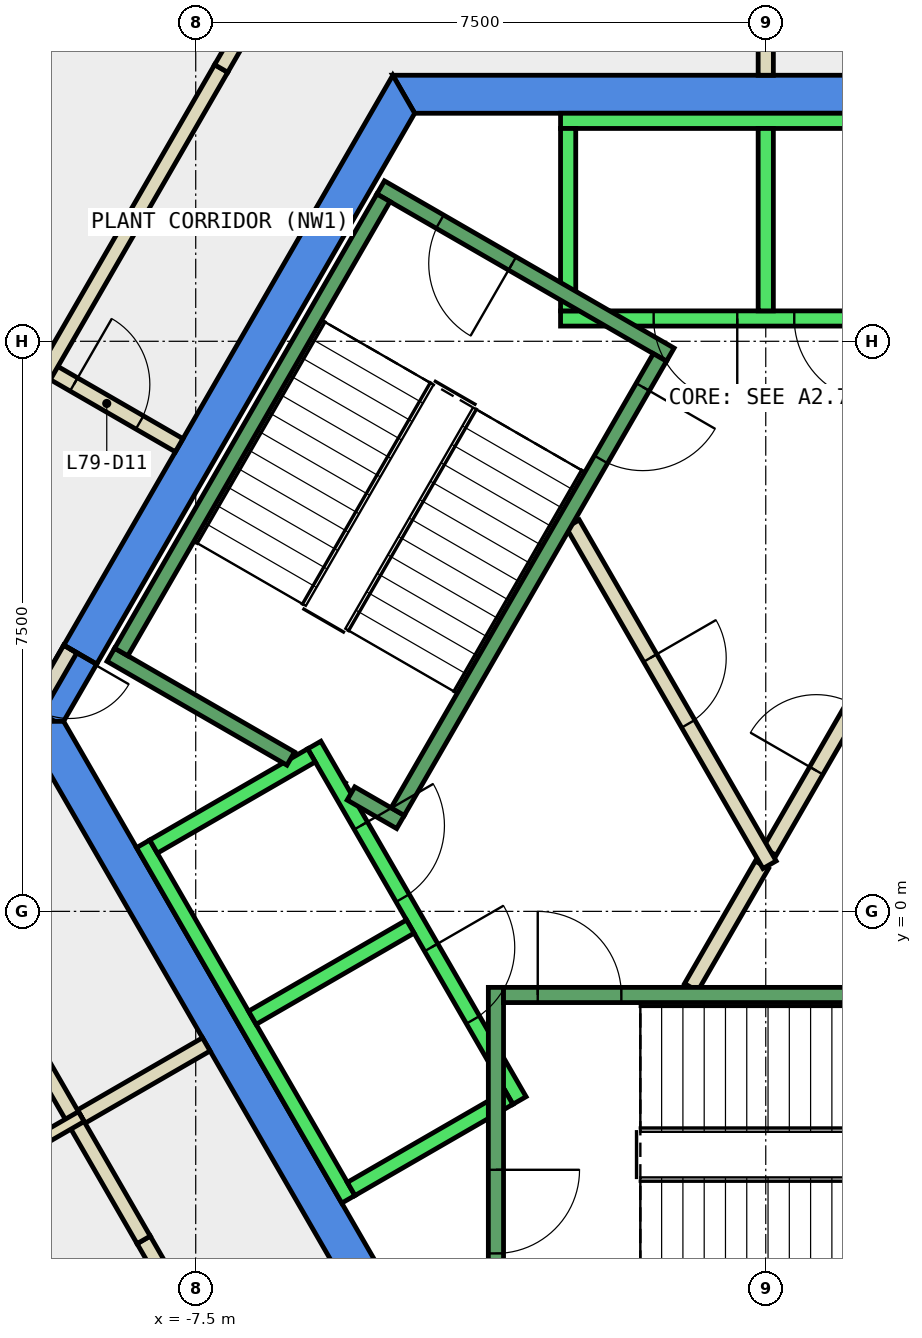
"""IFC4 building model, lengths in metres.
Left out: names, types, materials, properties, quantities, classifications, styles, units other than length and angle.
Written with IfcOpenShell. Run it as: python <this file> out.ifc"""

import sys

from ifc_helpers import new_model, si_unit, direction, frame, frame_2d, origin, place, context, subcontext, project, spatial, polyline, rectangle, outline, extrude, element, fill, save


model = new_model("IFC4")
c1 = context("Model", 3, precision=1e-05, world=origin(), true_north=direction((0.0, 1.0)))
c2 = subcontext(c1, "Body", "Model", "MODEL_VIEW")
j1 = project(units=[si_unit("LENGTHUNIT", "METRE"), si_unit("PLANEANGLEUNIT", "RADIAN")], contexts=[c1])
p1 = place(None, origin())
s1 = spatial("IfcSite", under=j1, at=p1, CompositionType="ELEMENT")
p2 = place(p1, origin())
s2 = spatial("IfcBuilding", under=s1, at=p2, CompositionType="ELEMENT")
p3 = place(p2, frame((0.0, 0.0, 335.9)))
s3 = spatial("IfcBuildingStorey", under=s2, at=p3, CompositionType="ELEMENT", Elevation=335.9)
p4 = place(p3, frame((0.0, 0.0, -0.35)))
e1 = element("IfcWall", 1, at=p4, inside=s3, PredefinedType="SHEAR", context=c2, shape_type="SweptSolid", body=[
    extrude(outline(polyline([(4.907, 11.0), (-4.907, 11.0), (-4.619, 10.5), (4.619, 10.5), (4.907, 11.0)])), origin(), (0.0, 0.0, 1.0), 4.4),
])
p5 = place(p3, frame((0.0, 0.0, -0.35)))
e2 = element("IfcWall", 2, at=p5, inside=s3, PredefinedType="SHEAR", context=c2, shape_type="SweptSolid", body=[
    extrude(outline(polyline([(-9.236, 3.502), (-8.803, 3.253), (-4.619, 10.5), (-4.907, 11.0), (-9.236, 3.502)])), origin(), (0.0, 0.0, 1.0), 4.4),
])
p6 = place(p3, frame((0.0, 0.0, 3.6)))
e3 = element("IfcWall", 3, at=p6, inside=s3, PredefinedType="SHEAR", context=c2, shape_type="SweptSolid", body=[
    extrude(outline(polyline([(-9.7, 2.7), (-9.354, 2.5), (-9.238, 2.5), (-8.803, 3.253), (-9.236, 3.502), (-9.7, 2.7)])), origin(), (0.0, 0.0, 1.0), 0.45),
])
p7 = place(p3, frame((0.0, 0.0, -0.35)))
e4 = element("IfcWall", 4, at=p7, inside=s3, PredefinedType="SHEAR", context=c2, shape_type="SweptSolid", body=[
    extrude(outline(polyline([(-9.815, 2.5), (-4.907, -6.0), (-4.619, -5.5), (-9.238, 2.5), (-9.815, 2.5)])), origin(), (0.0, 0.0, 1.0), 4.4),
])
p8 = place(p3, frame((-0.982, -1.0, 0.0), z_axis=(0.0, 0.0, 1.0), x_axis=(0.50024047865, 0.865886518847, 0.0)))
e5 = element("IfcWall", 5, at=p8, inside=s3, PredefinedType="PARTITIONING", context=c2, shape_type="SweptSolid", body=[
    extrude(rectangle(XDim=1.863, YDim=0.2, at=frame_2d((0.931, 0.0))), origin(), (0.0, 0.0, 1.0), 4.05),
])
p9 = place(p3, frame((0.05, 0.787, 0.0), z_axis=(0.0, 0.0, 1.0), x_axis=(0.499954076797, 0.866051915934, 0.0)))
e6 = element("IfcWall", 6, at=p9, inside=s3, PredefinedType="PARTITIONING", context=c2, shape_type="SweptSolid", body=[
    extrude(rectangle(XDim=3.558, YDim=0.2, at=frame_2d((1.779, 0.0))), origin(), (0.0, 0.0, 1.0), 4.05),
])
p10 = place(p9, frame((1.229, 0.0, 0.0)))
e7 = element("IfcOpeningElement", 7, at=p10, cuts=e6, PredefinedType="OPENING", context=c2, shape_type="SweptSolid", body=[
    extrude(rectangle(XDim=1.0, YDim=2.1, at=frame_2d((0.5, 1.05))), frame((0.0, 0.11, 0.0), z_axis=(0.0, -1.0, 0.0), x_axis=(1.0, 0.0, 0.0)), (0.0, 0.0, 1.0), 0.22),
])
p11 = place(p3, frame((-2.54, 5.1, 0.0), z_axis=(0.0, 0.0, 1.0), x_axis=(0.499925051871, -0.866068670783, 0.0)))
e8 = element("IfcWall", 8, at=p11, inside=s3, PredefinedType="PARTITIONING", context=c2, shape_type="SweptSolid", body=[
    extrude(rectangle(XDim=5.181, YDim=0.2, at=frame_2d((2.59, 0.0))), origin(), (0.0, 0.0, 1.0), 4.05),
])
p12 = place(p11, frame((2.04, 0.0, 0.0)))
e9 = element("IfcOpeningElement", 9, at=p12, cuts=e8, PredefinedType="OPENING", context=c2, shape_type="SweptSolid", body=[
    extrude(rectangle(XDim=1.0, YDim=2.1, at=frame_2d((0.5, 1.05))), frame((0.0, 0.11, 0.0), z_axis=(0.0, -1.0, 0.0), x_axis=(1.0, 0.0, 0.0)), (0.0, 0.0, 1.0), 0.22),
])
p13 = place(p3, frame((-9.006, -2.7, 0.0), z_axis=(0.0, 0.0, 1.0), x_axis=(0.865980106173, 0.500078449558, 0.0)))
e10 = element("IfcWall", 10, at=p13, inside=s3, PredefinedType="PARTITIONING", context=c2, shape_type="SweptSolid", body=[
    extrude(rectangle(XDim=1.9, YDim=0.2, at=frame_2d((0.95, 0.0))), origin(), (0.0, 0.0, 1.0), 4.05),
])
p14 = place(p3, frame((0.0, 11.0, 0.0), z_axis=(0.0, 0.0, 1.0), x_axis=(0.0, 1.0, 0.0)))
e11 = element("IfcWall", 11, at=p14, inside=s3, PredefinedType="PARTITIONING", context=c2, shape_type="SweptSolid", body=[
    extrude(rectangle(XDim=1.9, YDim=0.2, at=frame_2d((0.95, 0.0))), origin(), (0.0, 0.0, 1.0), 1.95),
])
p15 = place(p3, frame((-9.45, 7.132, 0.0), z_axis=(0.0, 0.0, 1.0), x_axis=(0.866010750942, -0.50002537861, 0.0)))
e12 = element("IfcWall", 12, at=p15, inside=s3, PredefinedType="PARTITIONING", context=c2, shape_type="SweptSolid", body=[
    extrude(rectangle(XDim=2.0, YDim=0.2, at=frame_2d((1.0, 0.0))), origin(), (0.0, 0.0, 1.0), 4.05),
])
p16 = place(p15, frame((0.4, 0.0, 0.0)))
e13 = element("IfcOpeningElement", 13, at=p16, cuts=e12, PredefinedType="OPENING", context=c2, shape_type="SweptSolid", body=[
    extrude(rectangle(XDim=1.0, YDim=2.1, at=frame_2d((0.5, 1.05))), frame((0.0, 0.11, 0.0), z_axis=(0.0, -1.0, 0.0), x_axis=(1.0, 0.0, 0.0)), (0.0, 0.0, 1.0), 0.22),
])
p17 = place(p3, frame((-9.105, -2.728, 0.0), z_axis=(0.0, 0.0, 1.0), x_axis=(-0.499849883363, 0.866112056319, 0.0)))
e14 = element("IfcWall", 14, at=p17, inside=s3, PredefinedType="PARTITIONING", context=c2, shape_type="SweptSolid", body=[
    extrude(rectangle(XDim=0.885, YDim=0.2, at=frame_2d((0.442, 0.0))), origin(), (0.0, 0.0, 1.0), 4.05),
])
p18 = place(p3, frame((-9.5, 7.045, 0.0), z_axis=(0.0, 0.0, 1.0), x_axis=(0.500007559336, 0.866021039356, 0.0)))
e15 = element("IfcWall", 15, at=p18, inside=s3, PredefinedType="PARTITIONING", context=c2, shape_type="SweptSolid", body=[
    extrude(rectangle(XDim=4.67, YDim=0.2, at=frame_2d((2.335, 0.0))), origin(), (0.0, 0.0, 1.0), 4.05),
])
p19 = place(p3, frame((-9.15, 3.452, 0.0), z_axis=(0.0, 0.0, 1.0), x_axis=(-0.500079945886, -0.865979242085, 0.0)))
e16 = element("IfcWall", 16, at=p19, inside=s3, PredefinedType="PARTITIONING", context=c2, shape_type="SweptSolid", body=[
    extrude(rectangle(XDim=0.926, YDim=0.2, at=frame_2d((0.463, 0.0))), origin(), (0.0, 0.0, 1.0), 2.4),
])
p20 = place(p19, frame((0.017, 0.0, 0.0)))
e17 = element("IfcOpeningElement", 17, at=p20, cuts=e16, PredefinedType="OPENING", context=c2, shape_type="SweptSolid", body=[
    extrude(rectangle(XDim=0.9, YDim=2.1, at=frame_2d((0.45, 1.05))), frame((0.0, 0.11, 0.0), z_axis=(0.0, -1.0, 0.0), x_axis=(1.0, 0.0, 0.0)), (0.0, 0.0, 1.0), 0.22),
])
p21 = place(p3, frame((-7.835, -4.928, 0.0), z_axis=(0.0, 0.0, 1.0), x_axis=(-0.500265973451, 0.865871789474, 0.0)))
e18 = element("IfcWall", 18, at=p21, inside=s3, PredefinedType="PARTITIONING", context=c2, shape_type="SweptSolid", body=[
    extrude(rectangle(XDim=0.7, YDim=0.2, at=frame_2d((0.35, 0.0))), origin(), (0.0, 0.0, 1.0), 1.95),
])
p22 = place(p3, frame((-8.185, -4.322, 0.0), z_axis=(0.0, 0.0, 1.0), x_axis=(-0.499848773445, 0.866112696874, 0.0)))
e19 = element("IfcWall", 19, at=p22, inside=s3, PredefinedType="PARTITIONING", context=c2, shape_type="SweptSolid", body=[
    extrude(rectangle(XDim=1.84, YDim=0.2, at=frame_2d((0.92, 0.0))), origin(), (0.0, 0.0, 1.0), 4.05),
])
p23 = place(p3, frame((-20.401, -9.28, 0.0), z_axis=(0.0, 0.0, 1.0), x_axis=(0.865982571061, 0.500074181116, 0.0)))
e20 = element("IfcWall", 20, at=p23, inside=s3, PredefinedType="PARTITIONING", context=c2, shape_type="SweptSolid", body=[
    extrude(rectangle(XDim=13.158, YDim=0.15, at=frame_2d((6.579, 0.0))), origin(), (0.0, 0.0, 1.0), 4.05),
])
p24 = place(p3, frame((-7.165, 11.089, 0.0), z_axis=(0.0, 0.0, 1.0), x_axis=(0.499024148071, 0.866588079564, 0.0)))
e21 = element("IfcWall", 21, at=p24, inside=s3, PredefinedType="PARTITIONING", context=c2, shape_type="SweptSolid", body=[
    extrude(rectangle(XDim=0.838, YDim=0.2, at=frame_2d((0.419, 0.0))), origin(), (0.0, 0.0, 1.0), 1.95),
])
p25 = place(p3, frame((2.7, 7.8, 0.0), z_axis=(0.0, 0.0, 1.0), x_axis=(-1.0, 0.0, 0.0)))
e22 = element("IfcWall", 22, at=p25, inside=s3, PredefinedType="STANDARD", context=c2, shape_type="SweptSolid", body=[
    extrude(rectangle(XDim=5.4, YDim=0.2, at=frame_2d((2.7, 0.0))), origin(), (0.0, 0.0, 1.0), 4.05),
])
p26 = place(p25, frame((1.225, 0.0, 0.0)))
e23 = element("IfcOpeningElement", 23, at=p26, cuts=e22, PredefinedType="OPENING", context=c2, shape_type="SweptSolid", body=[
    extrude(rectangle(XDim=1.1, YDim=2.1, at=frame_2d((0.55, 1.05))), frame((0.0, 0.11, 0.0), z_axis=(0.0, -1.0, 0.0), x_axis=(1.0, 0.0, 0.0)), (0.0, 0.0, 1.0), 0.22),
])
p27 = place(p25, frame((3.075, 0.0, 0.0)))
e24 = element("IfcOpeningElement", 24, at=p27, cuts=e22, PredefinedType="OPENING", context=c2, shape_type="SweptSolid", body=[
    extrude(rectangle(XDim=1.1, YDim=2.1, at=frame_2d((0.55, 1.05))), frame((0.0, 0.11, 0.0), z_axis=(0.0, -1.0, 0.0), x_axis=(1.0, 0.0, 0.0)), (0.0, 0.0, 1.0), 0.22),
])
p28 = place(p3, frame((2.7, 10.4, 0.0), z_axis=(0.0, 0.0, 1.0), x_axis=(-1.0, 0.0, 0.0)))
e25 = element("IfcWall", 25, at=p28, inside=s3, PredefinedType="STANDARD", context=c2, shape_type="SweptSolid", body=[
    extrude(rectangle(XDim=5.4, YDim=0.2, at=frame_2d((2.7, 0.0))), origin(), (0.0, 0.0, 1.0), 4.05),
])
for number, where, z_axis, x_axis in (
    (26, (0.0, 7.9, 0.0), (0.0, 0.0, 1.0), (0.0, 1.0, 0.0)),
    (27, (-2.6, 7.9, 0.0), (0.0, 0.0, 1.0), (0.0, 1.0, 0.0)),
):
    element("IfcWall", number, at=place(p3, frame(where, z_axis=z_axis, x_axis=x_axis)), inside=s3, PredefinedType="STANDARD", context=c2, shape_type="SweptSolid", body=[
        extrude(rectangle(XDim=2.4, YDim=0.2, at=frame_2d((1.2, 0.0))), origin(), (0.0, 0.0, 1.0), 4.05),
    ])
p29 = place(p3, frame((-5.94, 2.188, 0.0), z_axis=(0.0, 0.0, 1.0), x_axis=(0.500034260056, -0.866005622828, 0.0)))
e28 = element("IfcWall", 28, at=p29, inside=s3, PredefinedType="STANDARD", context=c2, shape_type="SweptSolid", body=[
    extrude(rectangle(XDim=5.399, YDim=0.2, at=frame_2d((2.7, 0.0))), origin(), (0.0, 0.0, 1.0), 4.05),
])
p30 = place(p29, frame((3.075, 0.0, 0.0)))
e29 = element("IfcOpeningElement", 29, at=p30, cuts=e28, PredefinedType="OPENING", context=c2, shape_type="SweptSolid", body=[
    extrude(rectangle(XDim=1.1, YDim=2.1, at=frame_2d((0.55, 1.05))), frame((0.0, 0.11, 0.0), z_axis=(0.0, -1.0, 0.0), x_axis=(1.0, 0.0, 0.0)), (0.0, 0.0, 1.0), 0.22),
])
p31 = place(p29, frame((1.225, 0.0, 0.0)))
e30 = element("IfcOpeningElement", 30, at=p31, cuts=e28, PredefinedType="OPENING", context=c2, shape_type="SweptSolid", body=[
    extrude(rectangle(XDim=1.1, YDim=2.1, at=frame_2d((0.55, 1.05))), frame((0.0, 0.11, 0.0), z_axis=(0.0, -1.0, 0.0), x_axis=(1.0, 0.0, 0.0)), (0.0, 0.0, 1.0), 0.22),
])
p32 = place(p3, frame((-8.192, 0.888, 0.0), z_axis=(0.0, 0.0, 1.0), x_axis=(0.500034260056, -0.866005622828, 0.0)))
e31 = element("IfcWall", 31, at=p32, inside=s3, PredefinedType="STANDARD", context=c2, shape_type="SweptSolid", body=[
    extrude(rectangle(XDim=5.399, YDim=0.2, at=frame_2d((2.7, 0.0))), origin(), (0.0, 0.0, 1.0), 4.05),
])
for number, where, z_axis, x_axis in (
    (32, (-5.977, 2.052, 0.0), (0.0, 0.0, 1.0), (-0.866, -0.5, 0.0)),
    (33, (-4.677, -0.2, 0.0), (0.0, 0.0, 1.0), (-0.866, -0.5, 0.0)),
):
    element("IfcWall", number, at=place(p3, frame(where, z_axis=z_axis, x_axis=x_axis)), inside=s3, PredefinedType="STANDARD", context=c2, shape_type="SweptSolid", body=[
        extrude(rectangle(XDim=2.399, YDim=0.2, at=frame_2d((1.2, 0.0))), origin(), (0.0, 0.0, 1.0), 4.05),
    ])
p33 = place(p3, frame((-3.377, -2.452, 0.0), z_axis=(0.0, 0.0, 1.0), x_axis=(-0.865955154139, -0.50012165622, 0.0)))
e34 = element("IfcWall", 34, at=p33, inside=s3, PredefinedType="STANDARD", context=c2, shape_type="SweptSolid", body=[
    extrude(rectangle(XDim=2.4, YDim=0.2, at=frame_2d((1.2, 0.0))), origin(), (0.0, 0.0, 1.0), 4.05),
])
p34 = place(p3, frame((-3.55, -1.0, 0.0), z_axis=(0.0, 0.0, 1.0), x_axis=(0.0, -1.0, 0.0)))
e35 = element("IfcWall", 35, at=p34, inside=s3, PredefinedType="STANDARD", context=c2, shape_type="SweptSolid", body=[
    extrude(rectangle(XDim=4.4, YDim=0.2, at=frame_2d((2.2, 0.0))), origin(), (0.0, 0.0, 1.0), 4.05),
])
p35 = place(p34, frame((2.4, 0.0, 0.0)))
e36 = element("IfcOpeningElement", 36, at=p35, cuts=e35, PredefinedType="OPENING", context=c2, shape_type="SweptSolid", body=[
    extrude(rectangle(XDim=1.1, YDim=2.2, at=frame_2d((0.55, 1.1))), frame((0.0, 0.11, 0.0), z_axis=(0.0, -1.0, 0.0), x_axis=(1.0, 0.0, 0.0)), (0.0, 0.0, 1.0), 0.22),
])
p36 = place(p3, frame((-3.45, -1.1, 0.0), z_axis=(0.0, 0.0, 1.0), x_axis=(1.0, 0.0, 0.0)))
e37 = element("IfcWall", 37, at=p36, inside=s3, PredefinedType="STANDARD", context=c2, shape_type="SweptSolid", body=[
    extrude(rectangle(XDim=6.9, YDim=0.2, at=frame_2d((3.45, 0.0))), origin(), (0.0, 0.0, 1.0), 4.05),
])
p37 = place(p36, frame((0.45, 0.0, 0.0)))
e38 = element("IfcOpeningElement", 38, at=p37, cuts=e37, PredefinedType="OPENING", context=c2, shape_type="SweptSolid", body=[
    extrude(rectangle(XDim=1.1, YDim=2.2, at=frame_2d((0.55, 1.1))), frame((0.0, 0.11, 0.0), z_axis=(0.0, -1.0, 0.0), x_axis=(1.0, 0.0, 0.0)), (0.0, 0.0, 1.0), 0.22),
])
p38 = place(p3, frame((-1.256, 7.324, 0.0), z_axis=(0.0, 0.0, 1.0), x_axis=(-0.866046073146, 0.499964197906, 0.0)))
e39 = element("IfcWall", 39, at=p38, inside=s3, PredefinedType="STANDARD", context=c2, shape_type="SweptSolid", body=[
    extrude(rectangle(XDim=4.4, YDim=0.2, at=frame_2d((2.2, 0.0))), origin(), (0.0, 0.0, 1.0), 4.05),
])
p39 = place(p38, frame((2.4, 0.0, 0.0)))
e40 = element("IfcOpeningElement", 40, at=p39, cuts=e39, PredefinedType="OPENING", context=c2, shape_type="SweptSolid", body=[
    extrude(rectangle(XDim=1.1, YDim=2.2, at=frame_2d((0.55, 1.1))), frame((0.0, 0.11, 0.0), z_axis=(0.0, -1.0, 0.0), x_axis=(1.0, 0.0, 0.0)), (0.0, 0.0, 1.0), 0.22),
])
p40 = place(p3, frame((-6.25, 2.01, 0.0), z_axis=(0.0, 0.0, 1.0), x_axis=(-0.86611865017, 0.499838457731, 0.0)))
e41 = element("IfcWall", 41, at=p40, inside=s3, PredefinedType="STANDARD", context=c2, shape_type="SweptSolid", body=[
    extrude(rectangle(XDim=2.733, YDim=0.2, at=frame_2d((1.366, 0.0))), origin(), (0.0, 0.0, 1.0), 4.05),
])
p41 = place(p3, frame((-4.806, 1.176, 0.0), z_axis=(0.0, 0.0, 1.0), x_axis=(-0.866558586415, 0.499075361355, 0.0)))
e42 = element("IfcWall", 42, at=p41, inside=s3, PredefinedType="STANDARD", context=c2, shape_type="SweptSolid", body=[
    extrude(rectangle(XDim=0.751, YDim=0.2, at=frame_2d((0.376, 0.0))), origin(), (0.0, 0.0, 1.0), 4.05),
])
p42 = place(p3, frame((-1.393, 7.288, 0.0), z_axis=(0.0, 0.0, 1.0), x_axis=(-0.499963383562, -0.866046543262, 0.0)))
e43 = element("IfcWall", 43, at=p42, inside=s3, PredefinedType="STANDARD", context=c2, shape_type="SweptSolid", body=[
    extrude(rectangle(XDim=6.9, YDim=0.2, at=frame_2d((3.45, 0.0))), origin(), (0.0, 0.0, 1.0), 4.05),
])
p43 = place(p42, frame((0.45, 0.0, 0.0)))
e44 = element("IfcOpeningElement", 44, at=p43, cuts=e43, PredefinedType="OPENING", context=c2, shape_type="SweptSolid", body=[
    extrude(rectangle(XDim=1.1, YDim=2.2, at=frame_2d((0.55, 1.1))), frame((0.0, 0.11, 0.0), z_axis=(0.0, -1.0, 0.0), x_axis=(1.0, 0.0, 0.0)), (0.0, 0.0, 1.0), 0.22),
])
p44 = place(p3, frame((-5.03, 9.388, 0.0), z_axis=(0.0, 0.0, 1.0), x_axis=(-0.499978703459, -0.866037698999, 0.0)))
e45 = element("IfcWall", 45, at=p44, inside=s3, PredefinedType="STANDARD", context=c2, shape_type="SweptSolid", body=[
    extrude(rectangle(XDim=6.9, YDim=0.2, at=frame_2d((3.45, 0.0))), origin(), (0.0, 0.0, 1.0), 4.05),
])
p45 = place(p16, origin())
e46 = element("IfcDoor", 46, at=p45, inside=s3, OperationType="SINGLE_SWING_LEFT", PredefinedType="DOOR", context=c2, shape_type="SweptSolid", body=[
    extrude(rectangle(XDim=1.0, YDim=2.1, at=frame_2d((0.5, 1.05))), frame((0.0, 0.025, 0.0), z_axis=(0.0, -1.0, 0.0), x_axis=(1.0, 0.0, 0.0)), (0.0, 0.0, 1.0), 0.05),
])
fill(e13, e46)
p46 = place(p10, origin())
e47 = element("IfcDoor", 47, at=p46, inside=s3, OperationType="SINGLE_SWING_RIGHT", PredefinedType="DOOR", context=c2, shape_type="SweptSolid", body=[
    extrude(rectangle(XDim=1.0, YDim=2.1, at=frame_2d((0.5, 1.05))), frame((0.0, 0.025, 0.0), z_axis=(0.0, -1.0, 0.0), x_axis=(1.0, 0.0, 0.0)), (0.0, 0.0, 1.0), 0.05),
])
fill(e7, e47)
p47 = place(p12, origin())
e48 = element("IfcDoor", 48, at=p47, inside=s3, OperationType="SINGLE_SWING_RIGHT", PredefinedType="DOOR", context=c2, shape_type="SweptSolid", body=[
    extrude(rectangle(XDim=1.0, YDim=2.1, at=frame_2d((0.5, 1.05))), frame((0.0, 0.025, 0.0), z_axis=(0.0, -1.0, 0.0), x_axis=(1.0, 0.0, 0.0)), (0.0, 0.0, 1.0), 0.05),
])
fill(e9, e48)
p48 = place(p20, origin())
e49 = element("IfcDoor", 49, at=p48, inside=s3, OperationType="SINGLE_SWING_LEFT", PredefinedType="DOOR", context=c2, shape_type="SweptSolid", body=[
    extrude(rectangle(XDim=0.9, YDim=2.1, at=frame_2d((0.45, 1.05))), frame((0.0, 0.025, 0.0), z_axis=(0.0, -1.0, 0.0), x_axis=(1.0, 0.0, 0.0)), (0.0, 0.0, 1.0), 0.05),
])
fill(e17, e49)
p49 = place(p26, origin())
e50 = element("IfcDoor", 50, at=p49, inside=s3, OperationType="SLIDING_TO_LEFT", PredefinedType="DOOR", context=c2, shape_type="SweptSolid", body=[
    extrude(rectangle(XDim=1.1, YDim=2.1, at=frame_2d((0.55, 1.05))), frame((0.0, 0.025, 0.0), z_axis=(0.0, -1.0, 0.0), x_axis=(1.0, 0.0, 0.0)), (0.0, 0.0, 1.0), 0.05),
])
fill(e23, e50)
p50 = place(p27, origin())
e51 = element("IfcDoor", 51, at=p50, inside=s3, OperationType="SLIDING_TO_LEFT", PredefinedType="DOOR", context=c2, shape_type="SweptSolid", body=[
    extrude(rectangle(XDim=1.1, YDim=2.1, at=frame_2d((0.55, 1.05))), frame((0.0, 0.025, 0.0), z_axis=(0.0, -1.0, 0.0), x_axis=(1.0, 0.0, 0.0)), (0.0, 0.0, 1.0), 0.05),
])
fill(e24, e51)
p51 = place(p30, origin())
e52 = element("IfcDoor", 52, at=p51, inside=s3, OperationType="SLIDING_TO_LEFT", PredefinedType="DOOR", context=c2, shape_type="SweptSolid", body=[
    extrude(rectangle(XDim=1.1, YDim=2.1, at=frame_2d((0.55, 1.05))), frame((0.0, 0.025, 0.0), z_axis=(0.0, -1.0, 0.0), x_axis=(1.0, 0.0, 0.0)), (0.0, 0.0, 1.0), 0.05),
])
fill(e29, e52)
p52 = place(p31, origin())
e53 = element("IfcDoor", 53, at=p52, inside=s3, OperationType="SLIDING_TO_LEFT", PredefinedType="DOOR", context=c2, shape_type="SweptSolid", body=[
    extrude(rectangle(XDim=1.1, YDim=2.1, at=frame_2d((0.55, 1.05))), frame((0.0, 0.025, 0.0), z_axis=(0.0, -1.0, 0.0), x_axis=(1.0, 0.0, 0.0)), (0.0, 0.0, 1.0), 0.05),
])
fill(e30, e53)
p53 = place(p37, origin())
e54 = element("IfcDoor", 54, at=p53, inside=s3, OperationType="SINGLE_SWING_LEFT", PredefinedType="DOOR", context=c2, shape_type="SweptSolid", body=[
    extrude(rectangle(XDim=1.1, YDim=2.2, at=frame_2d((0.55, 1.1))), frame((0.0, 0.025, 0.0), z_axis=(0.0, -1.0, 0.0), x_axis=(1.0, 0.0, 0.0)), (0.0, 0.0, 1.0), 0.05),
])
fill(e38, e54)
p54 = place(p35, origin())
e55 = element("IfcDoor", 55, at=p54, inside=s3, OperationType="SINGLE_SWING_LEFT", PredefinedType="DOOR", context=c2, shape_type="SweptSolid", body=[
    extrude(rectangle(XDim=1.1, YDim=2.2, at=frame_2d((0.55, 1.1))), frame((0.0, 0.025, 0.0), z_axis=(0.0, -1.0, 0.0), x_axis=(1.0, 0.0, 0.0)), (0.0, 0.0, 1.0), 0.05),
])
fill(e36, e55)
p55 = place(p43, origin())
e56 = element("IfcDoor", 56, at=p55, inside=s3, OperationType="SINGLE_SWING_LEFT", PredefinedType="DOOR", context=c2, shape_type="SweptSolid", body=[
    extrude(rectangle(XDim=1.1, YDim=2.2, at=frame_2d((0.55, 1.1))), frame((0.0, 0.025, 0.0), z_axis=(0.0, -1.0, 0.0), x_axis=(1.0, 0.0, 0.0)), (0.0, 0.0, 1.0), 0.05),
])
fill(e44, e56)
p56 = place(p39, origin())
e57 = element("IfcDoor", 57, at=p56, inside=s3, OperationType="SINGLE_SWING_LEFT", PredefinedType="DOOR", context=c2, shape_type="SweptSolid", body=[
    extrude(rectangle(XDim=1.1, YDim=2.2, at=frame_2d((0.55, 1.1))), frame((0.0, 0.025, 0.0), z_axis=(0.0, -1.0, 0.0), x_axis=(1.0, 0.0, 0.0)), (0.0, 0.0, 1.0), 0.05),
])
fill(e40, e57)
save(model, sys.argv[1])
